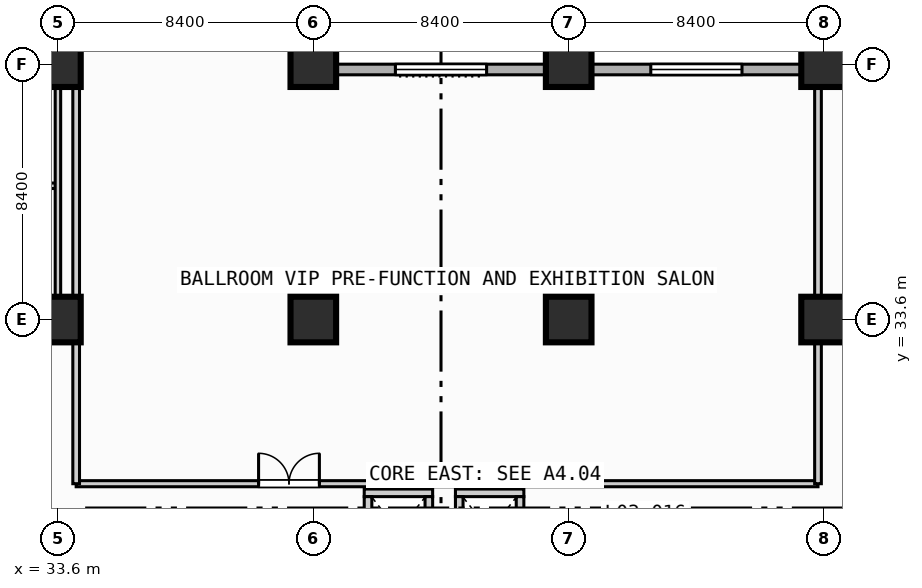
"""IFC4 building model, lengths in metres.
Left out: names, types, materials, properties, quantities, classifications, styles, units other than length and angle.
Written with IfcOpenShell. Run it as: python <this file> out.ifc"""

import sys

from ifc_helpers import new_model, si_unit, direction, frame, frame_2d, origin, origin_2d, place, context, subcontext, project, spatial, rectangle, extrude, element, fill, save


model = new_model("IFC4")
c1 = context("Model", 3, precision=1e-05, world=origin(), true_north=direction((0.0, 1.0)))
c2 = subcontext(c1, "Body", "Model", "MODEL_VIEW")
j1 = project(units=[si_unit("LENGTHUNIT", "METRE"), si_unit("PLANEANGLEUNIT", "RADIAN")], contexts=[c1])
p1 = place(None, origin())
s1 = spatial("IfcSite", under=j1, at=p1, CompositionType="ELEMENT")
p2 = place(p1, origin())
s2 = spatial("IfcBuilding", under=s1, at=p2, CompositionType="ELEMENT")
p3 = place(p2, frame((0.0, 0.0, 15.6)))
s3 = spatial("IfcBuildingStorey", under=s2, at=p3, CompositionType="ELEMENT", Elevation=15.6)
for number, where, z_axis, x_axis in (
    (1, (33.6, 33.6, 0.0), (0.0, 0.0, 1.0), (1.0, 0.0, 0.0)),
    (2, (33.6, 42.0, 0.0), (0.0, 0.0, 1.0), (1.0, 0.0, 0.0)),
    (3, (42.0, 33.6, 0.0), (0.0, 0.0, 1.0), (1.0, 0.0, 0.0)),
    (4, (42.0, 42.0, 0.0), (0.0, 0.0, 1.0), (1.0, 0.0, 0.0)),
    (5, (50.4, 33.6, 0.0), (0.0, 0.0, 1.0), (1.0, 0.0, 0.0)),
    (6, (50.4, 42.0, 0.0), (0.0, 0.0, 1.0), (1.0, 0.0, 0.0)),
    (7, (58.8, 33.6, 0.0), (0.0, 0.0, 1.0), (1.0, 0.0, 0.0)),
    (8, (58.8, 42.0, 0.0), (0.0, 0.0, 1.0), (1.0, 0.0, 0.0)),
):
    element("IfcColumn", number, at=place(p3, frame(where, z_axis=z_axis, x_axis=x_axis)), inside=s3, PredefinedType="COLUMN", context=c2, shape_type="SweptSolid", body=[
        extrude(rectangle(XDim=1.5, YDim=1.5, at=origin_2d()), origin(), (0.0, 0.0, 1.0), 5.2),
    ])
p4 = place(p3, frame((41.825, 89.225, 0.0), z_axis=(0.0, 0.0, 1.0), x_axis=(0.0, -1.0, 0.0)))
e9 = element("IfcWall", 9, at=p4, inside=s3, PredefinedType="STANDARD", context=c2, shape_type="SweptSolid", body=[
    extrude(rectangle(XDim=47.4, YDim=0.35, at=frame_2d((23.7, 0.0))), origin(), (0.0, 0.0, 1.0), 4.85),
])
p5 = place(p4, frame((33.125, 0.0, 0.85)))
e10 = element("IfcOpeningElement", 10, at=p5, cuts=e9, PredefinedType="OPENING", context=c2, shape_type="SweptSolid", body=[
    extrude(rectangle(XDim=3.0, YDim=2.4, at=frame_2d((1.5, 1.2))), frame((0.0, 0.185, 0.0), z_axis=(0.0, -1.0, 0.0), x_axis=(1.0, 0.0, 0.0)), (0.0, 0.0, 1.0), 0.37),
])
p6 = place(p4, frame((16.325, 0.0, 0.85)))
e11 = element("IfcOpeningElement", 11, at=p6, cuts=e9, PredefinedType="OPENING", context=c2, shape_type="SweptSolid", body=[
    extrude(rectangle(XDim=3.0, YDim=2.4, at=frame_2d((1.5, 1.2))), frame((0.0, 0.185, 0.0), z_axis=(0.0, -1.0, 0.0), x_axis=(1.0, 0.0, 0.0)), (0.0, 0.0, 1.0), 0.37),
])
p7 = place(p4, frame((7.925, 0.0, 0.85)))
e12 = element("IfcOpeningElement", 12, at=p7, cuts=e9, PredefinedType="OPENING", context=c2, shape_type="SweptSolid", body=[
    extrude(rectangle(XDim=3.0, YDim=2.4, at=frame_2d((1.5, 1.2))), frame((0.0, 0.185, 0.0), z_axis=(0.0, -1.0, 0.0), x_axis=(1.0, 0.0, 0.0)), (0.0, 0.0, 1.0), 0.37),
])
p8 = place(p3, frame((41.825, 41.825, 0.0), z_axis=(0.0, 0.0, 1.0), x_axis=(1.0, 0.0, 0.0)))
e13 = element("IfcWall", 13, at=p8, inside=s3, PredefinedType="STANDARD", context=c2, shape_type="SweptSolid", body=[
    extrude(rectangle(XDim=47.4, YDim=0.35, at=frame_2d((23.7, 0.0))), origin(), (0.0, 0.0, 1.0), 4.85),
])
p9 = place(p8, frame((2.875, 0.0, 0.85)))
e14 = element("IfcOpeningElement", 14, at=p9, cuts=e13, PredefinedType="OPENING", context=c2, shape_type="SweptSolid", body=[
    extrude(rectangle(XDim=3.0, YDim=2.4, at=frame_2d((1.5, 1.2))), frame((0.0, 0.185, 0.0), z_axis=(0.0, -1.0, 0.0), x_axis=(1.0, 0.0, 0.0)), (0.0, 0.0, 1.0), 0.37),
])
p10 = place(p8, frame((11.275, 0.0, 0.85)))
e15 = element("IfcOpeningElement", 15, at=p10, cuts=e13, PredefinedType="OPENING", context=c2, shape_type="SweptSolid", body=[
    extrude(rectangle(XDim=3.0, YDim=2.4, at=frame_2d((1.5, 1.2))), frame((0.0, 0.185, 0.0), z_axis=(0.0, -1.0, 0.0), x_axis=(1.0, 0.0, 0.0)), (0.0, 0.0, 1.0), 0.37),
])
p11 = place(p3, frame((43.675, 27.9, 0.0), z_axis=(0.0, 0.0, 1.0), x_axis=(1.0, 0.0, 0.0)))
e16 = element("IfcWall", 16, at=p11, inside=s3, PredefinedType="SOLIDWALL", context=c2, shape_type="SweptSolid", body=[
    extrude(rectangle(XDim=2.25, YDim=0.25, at=frame_2d((1.125, 0.0))), origin(), (0.0, 0.0, 1.0), 4.85),
])
for number, where, z_axis, x_axis in (
    (17, (43.8, 25.45, 0.0), (0.0, 0.0, 1.0), (0.0, 1.0, 0.0)),
    (18, (45.8, 25.45, 0.0), (0.0, 0.0, 1.0), (0.0, 1.0, 0.0)),
):
    element("IfcWall", number, at=place(p3, frame(where, z_axis=z_axis, x_axis=x_axis)), inside=s3, PredefinedType="SOLIDWALL", context=c2, shape_type="SweptSolid", body=[
        extrude(rectangle(XDim=2.325, YDim=0.25, at=frame_2d((1.163, 0.0))), origin(), (0.0, 0.0, 1.0), 4.85),
    ])
p12 = place(p3, frame((46.675, 27.9, 0.0), z_axis=(0.0, 0.0, 1.0), x_axis=(1.0, 0.0, 0.0)))
e19 = element("IfcWall", 19, at=p12, inside=s3, PredefinedType="SOLIDWALL", context=c2, shape_type="SweptSolid", body=[
    extrude(rectangle(XDim=2.25, YDim=0.25, at=frame_2d((1.125, 0.0))), origin(), (0.0, 0.0, 1.0), 4.85),
])
for number, where, z_axis, x_axis in (
    (20, (46.8, 25.45, 0.0), (0.0, 0.0, 1.0), (0.0, 1.0, 0.0)),
    (21, (48.8, 25.45, 0.0), (0.0, 0.0, 1.0), (0.0, 1.0, 0.0)),
):
    element("IfcWall", number, at=place(p3, frame(where, z_axis=z_axis, x_axis=x_axis)), inside=s3, PredefinedType="SOLIDWALL", context=c2, shape_type="SweptSolid", body=[
        extrude(rectangle(XDim=2.325, YDim=0.25, at=frame_2d((1.163, 0.0))), origin(), (0.0, 0.0, 1.0), 4.85),
    ])
p13 = place(p3, frame((28.8, 38.0, 0.0), z_axis=(0.0, 0.0, 1.0), x_axis=(1.0, 0.0, 0.0)))
e22 = element("IfcWall", 22, at=p13, inside=s3, PredefinedType="PLUMBINGWALL", context=c2, shape_type="SweptSolid", body=[
    extrude(rectangle(XDim=4.8, YDim=0.18, at=frame_2d((2.4, 0.0))), origin(), (0.0, 0.0, 1.0), 4.85),
])
p14 = place(p3, frame((33.6, 34.0, 0.0), z_axis=(0.0, 0.0, 1.0), x_axis=(0.0, 1.0, 0.0)))
e23 = element("IfcWall", 23, at=p14, inside=s3, PredefinedType="PLUMBINGWALL", context=c2, shape_type="SweptSolid", body=[
    extrude(rectangle(XDim=7.6, YDim=0.18, at=frame_2d((3.8, 0.0))), origin(), (0.0, 0.0, 1.0), 4.0),
])
p15 = place(p3, frame((28.8, 34.0, 0.0), z_axis=(0.0, 0.0, 1.0), x_axis=(1.0, 0.0, 0.0)))
e24 = element("IfcWall", 24, at=p15, inside=s3, PredefinedType="PLUMBINGWALL", context=c2, shape_type="SweptSolid", body=[
    extrude(rectangle(XDim=4.8, YDim=0.18, at=frame_2d((2.4, 0.0))), origin(), (0.0, 0.0, 1.0), 4.0),
])
p16 = place(p3, frame((28.8, 41.6, 0.0), z_axis=(0.0, 0.0, 1.0), x_axis=(1.0, 0.0, 0.0)))
e25 = element("IfcWall", 25, at=p16, inside=s3, PredefinedType="PLUMBINGWALL", context=c2, shape_type="SweptSolid", body=[
    extrude(rectangle(XDim=4.8, YDim=0.18, at=frame_2d((2.4, 0.0))), origin(), (0.0, 0.0, 1.0), 4.85),
])
p17 = place(p3, frame((34.2, 28.2, 0.0), z_axis=(0.0, 0.0, 1.0), x_axis=(1.0, 0.0, 0.0)))
e26 = element("IfcWall", 26, at=p17, inside=s3, PredefinedType="PARTITIONING", context=c2, shape_type="SweptSolid", body=[
    extrude(rectangle(XDim=24.4, YDim=0.2, at=frame_2d((12.2, 0.0))), origin(), (0.0, 0.0, 1.0), 4.85),
])
p18 = place(p17, frame((6.0, 0.0, 0.0)))
e27 = element("IfcOpeningElement", 27, at=p18, cuts=e26, PredefinedType="OPENING", context=c2, shape_type="SweptSolid", body=[
    extrude(rectangle(XDim=2.0, YDim=2.15, at=frame_2d((1.0, 1.075))), frame((0.0, 0.11, 0.0), z_axis=(0.0, -1.0, 0.0), x_axis=(1.0, 0.0, 0.0)), (0.0, 0.0, 1.0), 0.22),
])
p19 = place(p3, frame((34.2, 28.2, 0.0), z_axis=(0.0, 0.0, 1.0), x_axis=(0.0, 1.0, 0.0)))
e28 = element("IfcWall", 28, at=p19, inside=s3, PredefinedType="PARTITIONING", context=c2, shape_type="SweptSolid", body=[
    extrude(rectangle(XDim=13.4, YDim=0.22, at=frame_2d((6.7, 0.0))), origin(), (0.0, 0.0, 1.0), 4.85),
])
p20 = place(p3, frame((58.6, 28.2, 0.0), z_axis=(0.0, 0.0, 1.0), x_axis=(0.0, 1.0, 0.0)))
e29 = element("IfcWall", 29, at=p20, inside=s3, PredefinedType="PARTITIONING", context=c2, shape_type="SweptSolid", body=[
    extrude(rectangle(XDim=13.4, YDim=0.22, at=frame_2d((6.7, 0.0))), origin(), (0.0, 0.0, 1.0), 3.86),
])
p21 = place(p9, origin())
e30 = element("IfcWindow", 30, at=p21, inside=s3, PartitioningType="SINGLE_PANEL", PredefinedType="WINDOW", context=c2, shape_type="SweptSolid", body=[
    extrude(rectangle(XDim=3.0, YDim=2.4, at=frame_2d((1.5, 1.2))), frame((0.0, 0.03, 0.0), z_axis=(0.0, -1.0, 0.0), x_axis=(1.0, 0.0, 0.0)), (0.0, 0.0, 1.0), 0.06),
])
fill(e14, e30)
p22 = place(p10, origin())
e31 = element("IfcWindow", 31, at=p22, inside=s3, PartitioningType="SINGLE_PANEL", PredefinedType="WINDOW", context=c2, shape_type="SweptSolid", body=[
    extrude(rectangle(XDim=3.0, YDim=2.4, at=frame_2d((1.5, 1.2))), frame((0.0, 0.03, 0.0), z_axis=(0.0, -1.0, 0.0), x_axis=(1.0, 0.0, 0.0)), (0.0, 0.0, 1.0), 0.06),
])
fill(e15, e31)
p23 = place(p18, origin())
e32 = element("IfcDoor", 32, at=p23, inside=s3, OperationType="SINGLE_SWING_LEFT", PredefinedType="DOOR", context=c2, shape_type="SweptSolid", body=[
    extrude(rectangle(XDim=2.0, YDim=2.15, at=frame_2d((1.0, 1.075))), frame((0.0, 0.025, 0.0), z_axis=(0.0, -1.0, 0.0), x_axis=(1.0, 0.0, 0.0)), (0.0, 0.0, 1.0), 0.05),
])
fill(e27, e32)
save(model, sys.argv[1])
